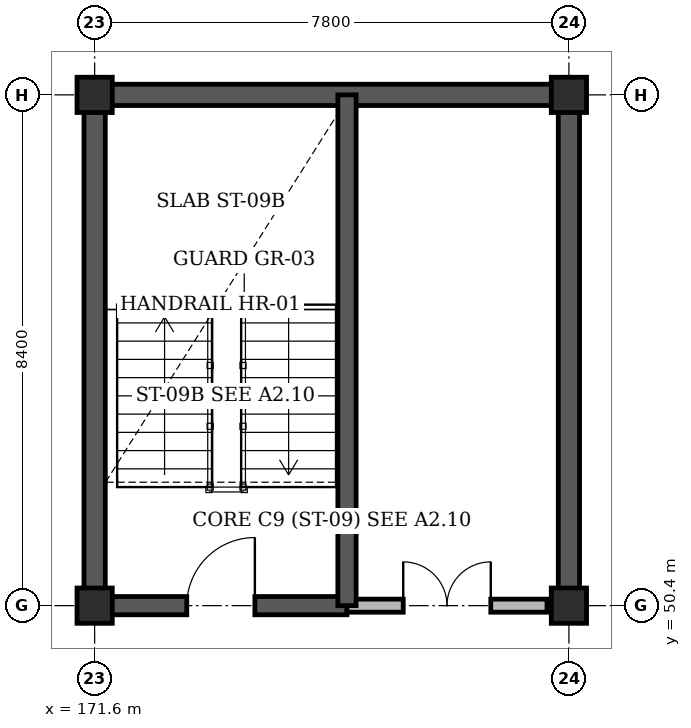
"""IFC4 building model, lengths in metres.
Left out: names, types, materials, properties, quantities, classifications, styles, units other than length and angle.
Written with IfcOpenShell. Run it as: python <this file> out.ifc"""

import sys

from ifc_helpers import new_model, si_unit, direction, frame, frame_2d, origin, origin_2d, place, context, subcontext, project, spatial, rectangle, extrude, element, fill, save


model = new_model("IFC4")
c1 = context("Model", 3, precision=1e-05, world=origin(), true_north=direction((0.0, 1.0)))
c2 = subcontext(c1, "Body", "Model", "MODEL_VIEW")
j1 = project(units=[si_unit("LENGTHUNIT", "METRE"), si_unit("PLANEANGLEUNIT", "RADIAN")], contexts=[c1])
p1 = place(None, origin())
s1 = spatial("IfcSite", under=j1, at=p1, CompositionType="ELEMENT")
p2 = place(p1, origin())
s2 = spatial("IfcBuilding", under=s1, at=p2, CompositionType="ELEMENT")
p3 = place(p2, frame((0.0, 0.0, 14.4)))
s3 = spatial("IfcBuildingStorey", under=s2, at=p3, CompositionType="ELEMENT", Elevation=14.4)
p4 = place(p3, frame((171.425, 58.8, 0.0), z_axis=(0.0, 0.0, 1.0), x_axis=(1.0, 0.0, 0.0)))
e1 = element("IfcWall", 1, at=p4, inside=s3, PredefinedType="SHEAR", context=c2, shape_type="SweptSolid", body=[
    extrude(rectangle(XDim=8.15, YDim=0.35, at=frame_2d((4.075, 0.0))), origin(), (0.0, 0.0, 1.0), 3.28),
])
for number, where, z_axis, x_axis in (
    (2, (171.6, 50.4, 0.0), (0.0, 0.0, 1.0), (0.0, 1.0, 0.0)),
    (3, (179.4, 50.4, 0.0), (0.0, 0.0, 1.0), (0.0, 1.0, 0.0)),
):
    element("IfcWall", number, at=place(p3, frame(where, z_axis=z_axis, x_axis=x_axis)), inside=s3, PredefinedType="SHEAR", context=c2, shape_type="SweptSolid", body=[
        extrude(rectangle(XDim=8.4, YDim=0.35, at=frame_2d((4.2, 0.0))), origin(), (0.0, 0.0, 1.0), 3.28),
    ])
for number, where, z_axis, x_axis in (
    (4, (171.6, 50.4, 0.0), (0.0, 0.0, 1.0), (1.0, 0.0, 0.0)),
    (5, (171.6, 58.8, 0.0), (0.0, 0.0, 1.0), (1.0, 0.0, 0.0)),
    (6, (179.4, 50.4, 0.0), (0.0, 0.0, 1.0), (1.0, 0.0, 0.0)),
    (7, (179.4, 58.8, 0.0), (0.0, 0.0, 1.0), (1.0, 0.0, 0.0)),
):
    element("IfcColumn", number, at=place(p3, frame(where, z_axis=z_axis, x_axis=x_axis)), inside=s3, PredefinedType="COLUMN", context=c2, shape_type="SweptSolid", body=[
        extrude(rectangle(XDim=0.58, YDim=0.58, at=origin_2d()), origin(), (0.0, 0.0, 1.0), 3.6),
    ])
p5 = place(p3, frame((171.6, 50.4, 0.0), z_axis=(0.0, 0.0, 1.0), x_axis=(1.0, 0.0, 0.0)))
e8 = element("IfcWall", 8, at=p5, inside=s3, PredefinedType="SHEAR", context=c2, shape_type="SweptSolid", body=[
    extrude(rectangle(XDim=4.15, YDim=0.3, at=frame_2d((2.075, 0.0))), origin(), (0.0, 0.0, 1.0), 3.6),
])
p6 = place(p5, frame((1.515, 0.0, 0.0)))
e9 = element("IfcOpeningElement", 9, at=p6, cuts=e8, PredefinedType="OPENING", context=c2, shape_type="SweptSolid", body=[
    extrude(rectangle(XDim=1.12, YDim=2.15, at=frame_2d((0.56, 1.075))), frame((0.0, 0.16, 0.0), z_axis=(0.0, -1.0, 0.0), x_axis=(1.0, 0.0, 0.0)), (0.0, 0.0, 1.0), 0.32),
])
p7 = place(p3, frame((175.75, 50.4, 0.0), z_axis=(0.0, 0.0, 1.0), x_axis=(1.0, 0.0, 0.0)))
e10 = element("IfcWall", 10, at=p7, inside=s3, PredefinedType="STANDARD", context=c2, shape_type="SweptSolid", body=[
    extrude(rectangle(XDim=3.29, YDim=0.215, at=frame_2d((1.645, 0.0))), origin(), (0.0, 0.0, 1.0), 2.62),
])
p8 = place(p7, frame((0.925, 0.0, 0.0)))
e11 = element("IfcOpeningElement", 11, at=p8, cuts=e10, PredefinedType="OPENING", context=c2, shape_type="SweptSolid", body=[
    extrude(rectangle(XDim=1.44, YDim=2.2, at=frame_2d((0.72, 1.1))), frame((0.0, 0.118, 0.0), z_axis=(0.0, -1.0, 0.0), x_axis=(1.0, 0.0, 0.0)), (0.0, 0.0, 1.0), 0.235),
])
p9 = place(p3, frame((175.75, 50.4, 0.0), z_axis=(0.0, 0.0, 1.0), x_axis=(0.0, 1.0, 0.0)))
e12 = element("IfcWall", 12, at=p9, inside=s3, PredefinedType="SHEAR", context=c2, shape_type="SweptSolid", body=[
    extrude(rectangle(XDim=8.4, YDim=0.3, at=frame_2d((4.2, 0.0))), origin(), (0.0, 0.0, 1.0), 3.6),
])
p10 = place(p6, origin())
e13 = element("IfcDoor", 13, at=p10, inside=s3, OperationType="SINGLE_SWING_RIGHT", PredefinedType="DOOR", context=c2, shape_type="SweptSolid", body=[
    extrude(rectangle(XDim=1.12, YDim=2.15, at=frame_2d((0.56, 1.075))), frame((0.0, 0.025, 0.0), z_axis=(0.0, -1.0, 0.0), x_axis=(1.0, 0.0, 0.0)), (0.0, 0.0, 1.0), 0.05),
])
fill(e9, e13)
p11 = place(p8, origin())
e14 = element("IfcDoor", 14, at=p11, inside=s3, OperationType="DOUBLE_DOOR_SINGLE_SWING", PredefinedType="DOOR", context=c2, shape_type="SweptSolid", body=[
    extrude(rectangle(XDim=1.44, YDim=2.2, at=frame_2d((0.72, 1.1))), frame((0.0, 0.025, 0.0), z_axis=(0.0, -1.0, 0.0), x_axis=(1.0, 0.0, 0.0)), (0.0, 0.0, 1.0), 0.05),
])
fill(e11, e14)
save(model, sys.argv[1])
